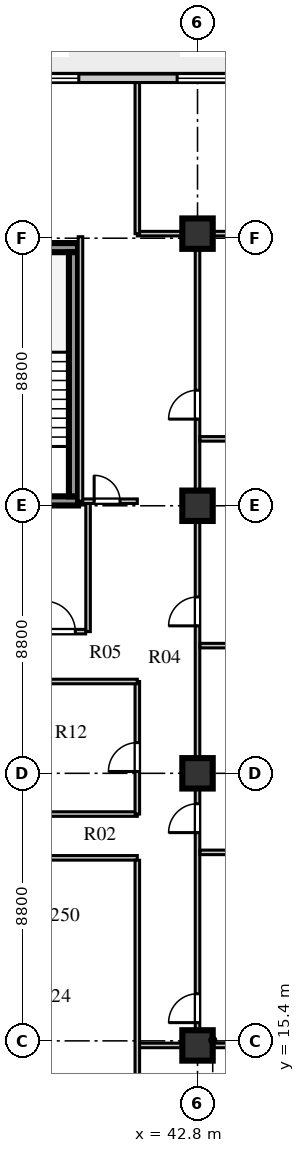
"""IFC4 building model, lengths in metres.
Left out: names, types, materials, properties, quantities, classifications, styles, units other than length and angle.
Written with IfcOpenShell. Run it as: python <this file> out.ifc"""

import sys

from ifc_helpers import new_model, si_unit, direction, frame, frame_2d, origin, origin_2d, place, context, subcontext, project, spatial, rectangle, extrude, element, fill, save


model = new_model("IFC4")
c1 = context("Model", 3, precision=1e-05, world=origin(), true_north=direction((0.0, 1.0)))
c2 = subcontext(c1, "Body", "Model", "MODEL_VIEW")
j1 = project(units=[si_unit("LENGTHUNIT", "METRE"), si_unit("PLANEANGLEUNIT", "RADIAN")], contexts=[c1])
p1 = place(None, origin())
s1 = spatial("IfcSite", under=j1, at=p1, CompositionType="ELEMENT")
p2 = place(p1, origin())
s2 = spatial("IfcBuilding", under=s1, at=p2, CompositionType="ELEMENT")
p3 = place(p2, frame((0.0, 0.0, 127.1)))
s3 = spatial("IfcBuildingStorey", under=s2, at=p3, CompositionType="ELEMENT", Elevation=127.1)
for number, where, z_axis, x_axis in (
    (1, (34.3, 33.16, 0.0), (0.0, 0.0, 1.0), (1.0, 0.0, 0.0)),
    (2, (34.3, 41.49, 0.0), (0.0, 0.0, 1.0), (1.0, 0.0, 0.0)),
):
    element("IfcWall", number, at=place(p3, frame(where, z_axis=z_axis, x_axis=x_axis)), inside=s3, PredefinedType="SHEAR", context=c2, shape_type="SweptSolid", body=[
        extrude(rectangle(XDim=4.57, YDim=0.3, at=frame_2d((2.285, 0.0))), origin(), (0.0, 0.0, 1.0), 3.6),
    ])
p4 = place(p3, frame((38.72, 33.31, 0.0), z_axis=(0.0, 0.0, 1.0), x_axis=(0.0, 1.0, 0.0)))
e3 = element("IfcWall", 3, at=p4, inside=s3, PredefinedType="SHEAR", context=c2, shape_type="SweptSolid", body=[
    extrude(rectangle(XDim=8.03, YDim=0.3, at=frame_2d((4.015, 0.0))), origin(), (0.0, 0.0, 1.0), 3.6),
])
for number, where, z_axis, x_axis in (
    (4, (42.8, 15.25, 0.0), (0.0, 0.0, 1.0), (1.0, 0.0, 0.0)),
    (5, (42.8, 24.2, 0.0), (0.0, 0.0, 1.0), (1.0, 0.0, 0.0)),
    (6, (42.8, 33.0, 0.0), (0.0, 0.0, 1.0), (1.0, 0.0, 0.0)),
    (7, (42.8, 41.95, 0.0), (0.0, 0.0, 1.0), (1.0, 0.0, 0.0)),
):
    element("IfcColumn", number, at=place(p3, frame(where, z_axis=z_axis, x_axis=x_axis)), inside=s3, PredefinedType="COLUMN", context=c2, shape_type="SweptSolid", body=[
        extrude(rectangle(XDim=1.0, YDim=1.0, at=origin_2d()), origin(), (0.0, 0.0, 1.0), 3.6),
    ])
p5 = place(p3, frame((45.35, 47.06, 0.0), z_axis=(0.0, 0.0, 1.0), x_axis=(-1.0, 0.0, 0.0)))
e8 = element("IfcWall", 8, at=p5, inside=s3, PredefinedType="STANDARD", context=c2, shape_type="SweptSolid", body=[
    extrude(rectangle(XDim=32.1, YDim=0.28, at=frame_2d((16.05, 0.0))), origin(), (0.0, 0.0, 1.0), 3.6),
])
p6 = place(p5, frame((30.15, 0.0, 0.0)))
e9 = element("IfcOpeningElement", 9, at=p6, cuts=e8, PredefinedType="OPENING", context=c2, shape_type="SweptSolid", body=[
    extrude(rectangle(XDim=1.0, YDim=2.05, at=frame_2d((0.5, 1.025))), frame((0.0, 0.15, 0.0), z_axis=(0.0, -1.0, 0.0), x_axis=(1.0, 0.0, 0.0)), (0.0, 0.0, 1.0), 0.3),
])
p7 = place(p5, frame((23.97, 0.0, 0.8)))
e10 = element("IfcOpeningElement", 10, at=p7, cuts=e8, PredefinedType="OPENING", context=c2, shape_type="SweptSolid", body=[
    extrude(rectangle(XDim=2.4, YDim=2.05, at=frame_2d((1.2, 1.025))), frame((0.0, 0.15, 0.0), z_axis=(0.0, -1.0, 0.0), x_axis=(1.0, 0.0, 0.0)), (0.0, 0.0, 1.0), 0.3),
])
p8 = place(p5, frame((18.23, 0.0, 0.8)))
e11 = element("IfcOpeningElement", 11, at=p8, cuts=e8, PredefinedType="OPENING", context=c2, shape_type="SweptSolid", body=[
    extrude(rectangle(XDim=1.2, YDim=1.75, at=frame_2d((0.6, 0.875))), frame((0.0, 0.15, 0.0), z_axis=(0.0, -1.0, 0.0), x_axis=(1.0, 0.0, 0.0)), (0.0, 0.0, 1.0), 0.3),
])
p9 = place(p5, frame((15.865, 0.0, 0.8)))
e12 = element("IfcOpeningElement", 12, at=p9, cuts=e8, PredefinedType="OPENING", context=c2, shape_type="SweptSolid", body=[
    extrude(rectangle(XDim=1.2, YDim=1.75, at=frame_2d((0.6, 0.875))), frame((0.0, 0.15, 0.0), z_axis=(0.0, -1.0, 0.0), x_axis=(1.0, 0.0, 0.0)), (0.0, 0.0, 1.0), 0.3),
])
p10 = place(p5, frame((13.255, 0.0, 0.8)))
e13 = element("IfcOpeningElement", 13, at=p10, cuts=e8, PredefinedType="OPENING", context=c2, shape_type="SweptSolid", body=[
    extrude(rectangle(XDim=1.65, YDim=1.95, at=frame_2d((0.825, 0.975))), frame((0.0, 0.15, 0.0), z_axis=(0.0, -1.0, 0.0), x_axis=(1.0, 0.0, 0.0)), (0.0, 0.0, 1.0), 0.3),
])
p11 = place(p5, frame((11.095, 0.0, 0.8)))
e14 = element("IfcOpeningElement", 14, at=p11, cuts=e8, PredefinedType="OPENING", context=c2, shape_type="SweptSolid", body=[
    extrude(rectangle(XDim=1.2, YDim=1.75, at=frame_2d((0.6, 0.875))), frame((0.0, 0.15, 0.0), z_axis=(0.0, -1.0, 0.0), x_axis=(1.0, 0.0, 0.0)), (0.0, 0.0, 1.0), 0.3),
])
p12 = place(p5, frame((6.455, 0.0, 0.8)))
e15 = element("IfcOpeningElement", 15, at=p12, cuts=e8, PredefinedType="OPENING", context=c2, shape_type="SweptSolid", body=[
    extrude(rectangle(XDim=2.25, YDim=2.0, at=frame_2d((1.125, 1.0))), frame((0.0, 0.15, 0.0), z_axis=(0.0, -1.0, 0.0), x_axis=(1.0, 0.0, 0.0)), (0.0, 0.0, 1.0), 0.3),
])
p13 = place(p5, frame((1.42, 0.0, 0.8)))
e16 = element("IfcOpeningElement", 16, at=p13, cuts=e8, PredefinedType="OPENING", context=c2, shape_type="SweptSolid", body=[
    extrude(rectangle(XDim=1.8, YDim=2.0, at=frame_2d((0.9, 1.0))), frame((0.0, 0.15, 0.0), z_axis=(0.0, -1.0, 0.0), x_axis=(1.0, 0.0, 0.0)), (0.0, 0.0, 1.0), 0.3),
])
p14 = place(p3, frame((39.2, 28.86, 0.0), z_axis=(0.0, 0.0, 1.0), x_axis=(0.0, 1.0, 0.0)))
e17 = element("IfcWall", 17, at=p14, inside=s3, PredefinedType="PARTITIONING", context=c2, shape_type="SweptSolid", body=[
    extrude(rectangle(XDim=4.22, YDim=0.15, at=frame_2d((2.11, 0.0))), origin(), (0.0, 0.0, 1.0), 3.6),
])
p15 = place(p3, frame((37.48, 28.86, 0.0), z_axis=(0.0, 0.0, 1.0), x_axis=(1.0, 0.0, 0.0)))
e18 = element("IfcWall", 18, at=p15, inside=s3, PredefinedType="PARTITIONING", context=c2, shape_type="SweptSolid", body=[
    extrude(rectangle(XDim=1.64, YDim=0.15, at=frame_2d((0.82, 0.0))), origin(), (0.0, 0.0, 1.0), 3.6),
])
p16 = place(p15, frame((0.3, 0.0, 0.0)))
e19 = element("IfcOpeningElement", 19, at=p16, cuts=e18, PredefinedType="OPENING", context=c2, shape_type="SweptSolid", body=[
    extrude(rectangle(XDim=1.0, YDim=2.1, at=frame_2d((0.5, 1.05))), frame((0.0, 0.085, 0.0), z_axis=(0.0, -1.0, 0.0), x_axis=(1.0, 0.0, 0.0)), (0.0, 0.0, 1.0), 0.17),
])
p17 = place(p3, frame((25.22, 21.42, 0.0), z_axis=(0.0, 0.0, 1.0), x_axis=(1.0, 0.0, 0.0)))
e20 = element("IfcWall", 20, at=p17, inside=s3, PredefinedType="PARTITIONING", context=c2, shape_type="SweptSolid", body=[
    extrude(rectangle(XDim=15.6, YDim=0.15, at=frame_2d((7.8, 0.0))), origin(), (0.0, 0.0, 1.0), 3.2),
])
p18 = place(p17, frame((0.73, 0.0, 0.0)))
e21 = element("IfcOpeningElement", 21, at=p18, cuts=e20, PredefinedType="OPENING", context=c2, shape_type="SweptSolid", body=[
    extrude(rectangle(XDim=0.95, YDim=2.1, at=frame_2d((0.475, 1.05))), frame((0.0, 0.085, 0.0), z_axis=(0.0, -1.0, 0.0), x_axis=(1.0, 0.0, 0.0)), (0.0, 0.0, 1.0), 0.17),
])
p19 = place(p17, frame((5.23, 0.0, 0.0)))
e22 = element("IfcOpeningElement", 22, at=p19, cuts=e20, PredefinedType="OPENING", context=c2, shape_type="SweptSolid", body=[
    extrude(rectangle(XDim=0.95, YDim=2.1, at=frame_2d((0.475, 1.05))), frame((0.0, 0.085, 0.0), z_axis=(0.0, -1.0, 0.0), x_axis=(1.0, 0.0, 0.0)), (0.0, 0.0, 1.0), 0.17),
])
p20 = place(p17, frame((10.83, 0.0, 0.0)))
e23 = element("IfcOpeningElement", 23, at=p20, cuts=e20, PredefinedType="OPENING", context=c2, shape_type="SweptSolid", body=[
    extrude(rectangle(XDim=0.95, YDim=2.1, at=frame_2d((0.475, 1.05))), frame((0.0, 0.085, 0.0), z_axis=(0.0, -1.0, 0.0), x_axis=(1.0, 0.0, 0.0)), (0.0, 0.0, 1.0), 0.17),
])
p21 = place(p3, frame((27.15, 22.86, 0.0), z_axis=(0.0, 0.0, 1.0), x_axis=(1.0, 0.0, 0.0)))
e24 = element("IfcWall", 24, at=p21, inside=s3, PredefinedType="PARTITIONING", context=c2, shape_type="SweptSolid", body=[
    extrude(rectangle(XDim=13.67, YDim=0.15, at=frame_2d((6.835, 0.0))), origin(), (0.0, 0.0, 1.0), 3.6),
])
p22 = place(p21, frame((2.2, 0.0, 0.0)))
e25 = element("IfcOpeningElement", 25, at=p22, cuts=e24, PredefinedType="OPENING", context=c2, shape_type="SweptSolid", body=[
    extrude(rectangle(XDim=0.9, YDim=2.08, at=frame_2d((0.45, 1.04))), frame((0.0, 0.085, 0.0), z_axis=(0.0, -1.0, 0.0), x_axis=(1.0, 0.0, 0.0)), (0.0, 0.0, 1.0), 0.17),
])
p23 = place(p3, frame((42.8, 15.25, 0.0), z_axis=(0.0, 0.0, 1.0), x_axis=(0.0, 1.0, 0.0)))
e26 = element("IfcWall", 26, at=p23, inside=s3, PredefinedType="PARTITIONING", context=c2, shape_type="SweptSolid", body=[
    extrude(rectangle(XDim=26.7, YDim=0.15, at=frame_2d((13.35, 0.0))), origin(), (0.0, 0.0, 1.0), 2.95),
])
p24 = place(p23, frame((0.75, 0.0, 0.0)))
e27 = element("IfcOpeningElement", 27, at=p24, cuts=e26, PredefinedType="OPENING", context=c2, shape_type="SweptSolid", body=[
    extrude(rectangle(XDim=0.95, YDim=2.1, at=frame_2d((0.475, 1.05))), frame((0.0, 0.085, 0.0), z_axis=(0.0, -1.0, 0.0), x_axis=(1.0, 0.0, 0.0)), (0.0, 0.0, 1.0), 0.17),
])
p25 = place(p23, frame((7.0, 0.0, 0.0)))
e28 = element("IfcOpeningElement", 28, at=p25, cuts=e26, PredefinedType="OPENING", context=c2, shape_type="SweptSolid", body=[
    extrude(rectangle(XDim=0.95, YDim=2.1, at=frame_2d((0.475, 1.05))), frame((0.0, 0.085, 0.0), z_axis=(0.0, -1.0, 0.0), x_axis=(1.0, 0.0, 0.0)), (0.0, 0.0, 1.0), 0.17),
])
p26 = place(p23, frame((13.8, 0.0, 0.0)))
e29 = element("IfcOpeningElement", 29, at=p26, cuts=e26, PredefinedType="OPENING", context=c2, shape_type="SweptSolid", body=[
    extrude(rectangle(XDim=0.95, YDim=2.1, at=frame_2d((0.475, 1.05))), frame((0.0, 0.085, 0.0), z_axis=(0.0, -1.0, 0.0), x_axis=(1.0, 0.0, 0.0)), (0.0, 0.0, 1.0), 0.17),
])
p27 = place(p23, frame((20.6, 0.0, 0.0)))
e30 = element("IfcOpeningElement", 30, at=p27, cuts=e26, PredefinedType="OPENING", context=c2, shape_type="SweptSolid", body=[
    extrude(rectangle(XDim=0.95, YDim=2.1, at=frame_2d((0.475, 1.05))), frame((0.0, 0.085, 0.0), z_axis=(0.0, -1.0, 0.0), x_axis=(1.0, 0.0, 0.0)), (0.0, 0.0, 1.0), 0.17),
])
for number, where, z_axis, x_axis in (
    (31, (40.82, 15.25, 0.0), (0.0, 0.0, 1.0), (1.0, 0.0, 0.0)),
    (32, (40.82, 41.95, 0.0), (0.0, 0.0, 1.0), (1.0, 0.0, 0.0)),
):
    element("IfcWall", number, at=place(p3, frame(where, z_axis=z_axis, x_axis=x_axis)), inside=s3, PredefinedType="PARTITIONING", context=c2, shape_type="SweptSolid", body=[
        extrude(rectangle(XDim=7.3, YDim=0.15, at=frame_2d((3.65, 0.0))), origin(), (0.0, 0.0, 1.0), 2.95),
    ])
p28 = place(p3, frame((40.82, 22.86, 0.0), z_axis=(0.0, 0.0, 1.0), x_axis=(0.0, 1.0, 0.0)))
e33 = element("IfcWall", 33, at=p28, inside=s3, PredefinedType="PARTITIONING", context=c2, shape_type="SweptSolid", body=[
    extrude(rectangle(XDim=4.36, YDim=0.15, at=frame_2d((2.18, 0.0))), origin(), (0.0, 0.0, 1.0), 3.6),
])
p29 = place(p28, frame((1.4, 0.0, 0.0)))
e34 = element("IfcOpeningElement", 34, at=p29, cuts=e33, PredefinedType="OPENING", context=c2, shape_type="SweptSolid", body=[
    extrude(rectangle(XDim=0.95, YDim=2.1, at=frame_2d((0.475, 1.05))), frame((0.0, 0.085, 0.0), z_axis=(0.0, -1.0, 0.0), x_axis=(1.0, 0.0, 0.0)), (0.0, 0.0, 1.0), 0.17),
])
p30 = place(p3, frame((36.9, 27.22, 0.0), z_axis=(0.0, 0.0, 1.0), x_axis=(1.0, 0.0, 0.0)))
e35 = element("IfcWall", 35, at=p30, inside=s3, PredefinedType="PARTITIONING", context=c2, shape_type="SweptSolid", body=[
    extrude(rectangle(XDim=3.92, YDim=0.15, at=frame_2d((1.96, 0.0))), origin(), (0.0, 0.0, 1.0), 3.2),
])
p31 = place(p3, frame((40.82, 10.28, 0.0), z_axis=(0.0, 0.0, 1.0), x_axis=(0.0, 1.0, 0.0)))
e36 = element("IfcWall", 36, at=p31, inside=s3, PredefinedType="PARTITIONING", context=c2, shape_type="SweptSolid", body=[
    extrude(rectangle(XDim=11.06, YDim=0.15, at=frame_2d((5.53, 0.0))), origin(), (0.0, 0.0, 1.0), 3.6),
])
for number, where, z_axis, x_axis in (
    (37, (42.88, 21.6, 0.0), (0.0, 0.0, 1.0), (1.0, 0.0, 0.0)),
    (38, (42.88, 28.4, 0.0), (0.0, 0.0, 1.0), (1.0, 0.0, 0.0)),
    (39, (42.88, 35.2, 0.0), (0.0, 0.0, 1.0), (1.0, 0.0, 0.0)),
):
    element("IfcWall", number, at=place(p3, frame(where, z_axis=z_axis, x_axis=x_axis)), inside=s3, PredefinedType="PARTITIONING", context=c2, shape_type="SweptSolid", body=[
        extrude(rectangle(XDim=5.24, YDim=0.15, at=frame_2d((2.62, 0.0))), origin(), (0.0, 0.0, 1.0), 3.6),
    ])
p32 = place(p3, frame((38.95, 33.15, 0.0), z_axis=(0.0, 0.0, 1.0), x_axis=(1.0, 0.0, 0.0)))
e40 = element("IfcWall", 40, at=p32, inside=s3, PredefinedType="PARTITIONING", context=c2, shape_type="SweptSolid", body=[
    extrude(rectangle(XDim=1.87, YDim=0.15, at=frame_2d((0.935, 0.0))), origin(), (0.0, 0.0, 1.0), 3.6),
])
p33 = place(p32, frame((0.45, 0.0, 0.0)))
e41 = element("IfcOpeningElement", 41, at=p33, cuts=e40, PredefinedType="OPENING", context=c2, shape_type="SweptSolid", body=[
    extrude(rectangle(XDim=0.85, YDim=2.05, at=frame_2d((0.425, 1.025))), frame((0.0, 0.085, 0.0), z_axis=(0.0, -1.0, 0.0), x_axis=(1.0, 0.0, 0.0)), (0.0, 0.0, 1.0), 0.17),
])
p34 = place(p3, frame((38.95, 33.15, 0.0), z_axis=(0.0, 0.0, 1.0), x_axis=(0.0, 1.0, 0.0)))
e42 = element("IfcWall", 42, at=p34, inside=s3, PredefinedType="PARTITIONING", context=c2, shape_type="SweptSolid", body=[
    extrude(rectangle(XDim=8.7, YDim=0.15, at=frame_2d((4.35, 0.0))), origin(), (0.0, 0.0, 1.0), 3.6),
])
p35 = place(p3, frame((40.82, 41.95, 0.0), z_axis=(0.0, 0.0, 1.0), x_axis=(0.0, 1.0, 0.0)))
e43 = element("IfcWall", 43, at=p35, inside=s3, PredefinedType="PARTITIONING", context=c2, shape_type="SweptSolid", body=[
    extrude(rectangle(XDim=4.97, YDim=0.15, at=frame_2d((2.485, 0.0))), origin(), (0.0, 0.0, 1.0), 3.6),
])
p36 = place(p12, origin())
e44 = element("IfcWindow", 44, at=p36, inside=s3, PartitioningType="SINGLE_PANEL", PredefinedType="WINDOW", context=c2, shape_type="SweptSolid", body=[
    extrude(rectangle(XDim=2.25, YDim=2.0, at=frame_2d((1.125, 1.0))), frame((0.0, 0.03, 0.0), z_axis=(0.0, -1.0, 0.0), x_axis=(1.0, 0.0, 0.0)), (0.0, 0.0, 1.0), 0.06),
])
fill(e15, e44)
p37 = place(p13, origin())
e45 = element("IfcWindow", 45, at=p37, inside=s3, PartitioningType="SINGLE_PANEL", PredefinedType="WINDOW", context=c2, shape_type="SweptSolid", body=[
    extrude(rectangle(XDim=1.8, YDim=2.0, at=frame_2d((0.9, 1.0))), frame((0.0, 0.03, 0.0), z_axis=(0.0, -1.0, 0.0), x_axis=(1.0, 0.0, 0.0)), (0.0, 0.0, 1.0), 0.06),
])
fill(e16, e45)
p38 = place(p16, origin())
e46 = element("IfcDoor", 46, at=p38, inside=s3, OperationType="SINGLE_SWING_LEFT", PredefinedType="DOOR", context=c2, shape_type="SweptSolid", body=[
    extrude(rectangle(XDim=1.0, YDim=2.1, at=frame_2d((0.5, 1.05))), frame((0.0, 0.025, 0.0), z_axis=(0.0, -1.0, 0.0), x_axis=(1.0, 0.0, 0.0)), (0.0, 0.0, 1.0), 0.05),
])
fill(e19, e46)
p39 = place(p29, frame((0.95, 0.0, 0.0), z_axis=(0.0, 0.0, 1.0), x_axis=(-1.0, 0.0, 0.0)))
e47 = element("IfcDoor", 47, at=p39, inside=s3, OperationType="SINGLE_SWING_RIGHT", PredefinedType="DOOR", context=c2, shape_type="SweptSolid", body=[
    extrude(rectangle(XDim=0.95, YDim=2.1, at=frame_2d((0.475, 1.05))), frame((0.0, 0.025, 0.0), z_axis=(0.0, -1.0, 0.0), x_axis=(1.0, 0.0, 0.0)), (0.0, 0.0, 1.0), 0.05),
])
fill(e34, e47)
p40 = place(p24, origin())
e48 = element("IfcDoor", 48, at=p40, inside=s3, OperationType="SINGLE_SWING_LEFT", PredefinedType="DOOR", context=c2, shape_type="SweptSolid", body=[
    extrude(rectangle(XDim=0.95, YDim=2.1, at=frame_2d((0.475, 1.05))), frame((0.0, 0.025, 0.0), z_axis=(0.0, -1.0, 0.0), x_axis=(1.0, 0.0, 0.0)), (0.0, 0.0, 1.0), 0.05),
])
fill(e27, e48)
p41 = place(p25, origin())
e49 = element("IfcDoor", 49, at=p41, inside=s3, OperationType="SINGLE_SWING_LEFT", PredefinedType="DOOR", context=c2, shape_type="SweptSolid", body=[
    extrude(rectangle(XDim=0.95, YDim=2.1, at=frame_2d((0.475, 1.05))), frame((0.0, 0.025, 0.0), z_axis=(0.0, -1.0, 0.0), x_axis=(1.0, 0.0, 0.0)), (0.0, 0.0, 1.0), 0.05),
])
fill(e28, e49)
p42 = place(p26, origin())
e50 = element("IfcDoor", 50, at=p42, inside=s3, OperationType="SINGLE_SWING_LEFT", PredefinedType="DOOR", context=c2, shape_type="SweptSolid", body=[
    extrude(rectangle(XDim=0.95, YDim=2.1, at=frame_2d((0.475, 1.05))), frame((0.0, 0.025, 0.0), z_axis=(0.0, -1.0, 0.0), x_axis=(1.0, 0.0, 0.0)), (0.0, 0.0, 1.0), 0.05),
])
fill(e29, e50)
p43 = place(p27, origin())
e51 = element("IfcDoor", 51, at=p43, inside=s3, OperationType="SINGLE_SWING_LEFT", PredefinedType="DOOR", context=c2, shape_type="SweptSolid", body=[
    extrude(rectangle(XDim=0.95, YDim=2.1, at=frame_2d((0.475, 1.05))), frame((0.0, 0.025, 0.0), z_axis=(0.0, -1.0, 0.0), x_axis=(1.0, 0.0, 0.0)), (0.0, 0.0, 1.0), 0.05),
])
fill(e30, e51)
p44 = place(p33, origin())
e52 = element("IfcDoor", 52, at=p44, inside=s3, OperationType="SINGLE_SWING_LEFT", PredefinedType="DOOR", context=c2, shape_type="SweptSolid", body=[
    extrude(rectangle(XDim=0.85, YDim=2.05, at=frame_2d((0.425, 1.025))), frame((0.0, 0.025, 0.0), z_axis=(0.0, -1.0, 0.0), x_axis=(1.0, 0.0, 0.0)), (0.0, 0.0, 1.0), 0.05),
])
fill(e41, e52)
save(model, sys.argv[1])
